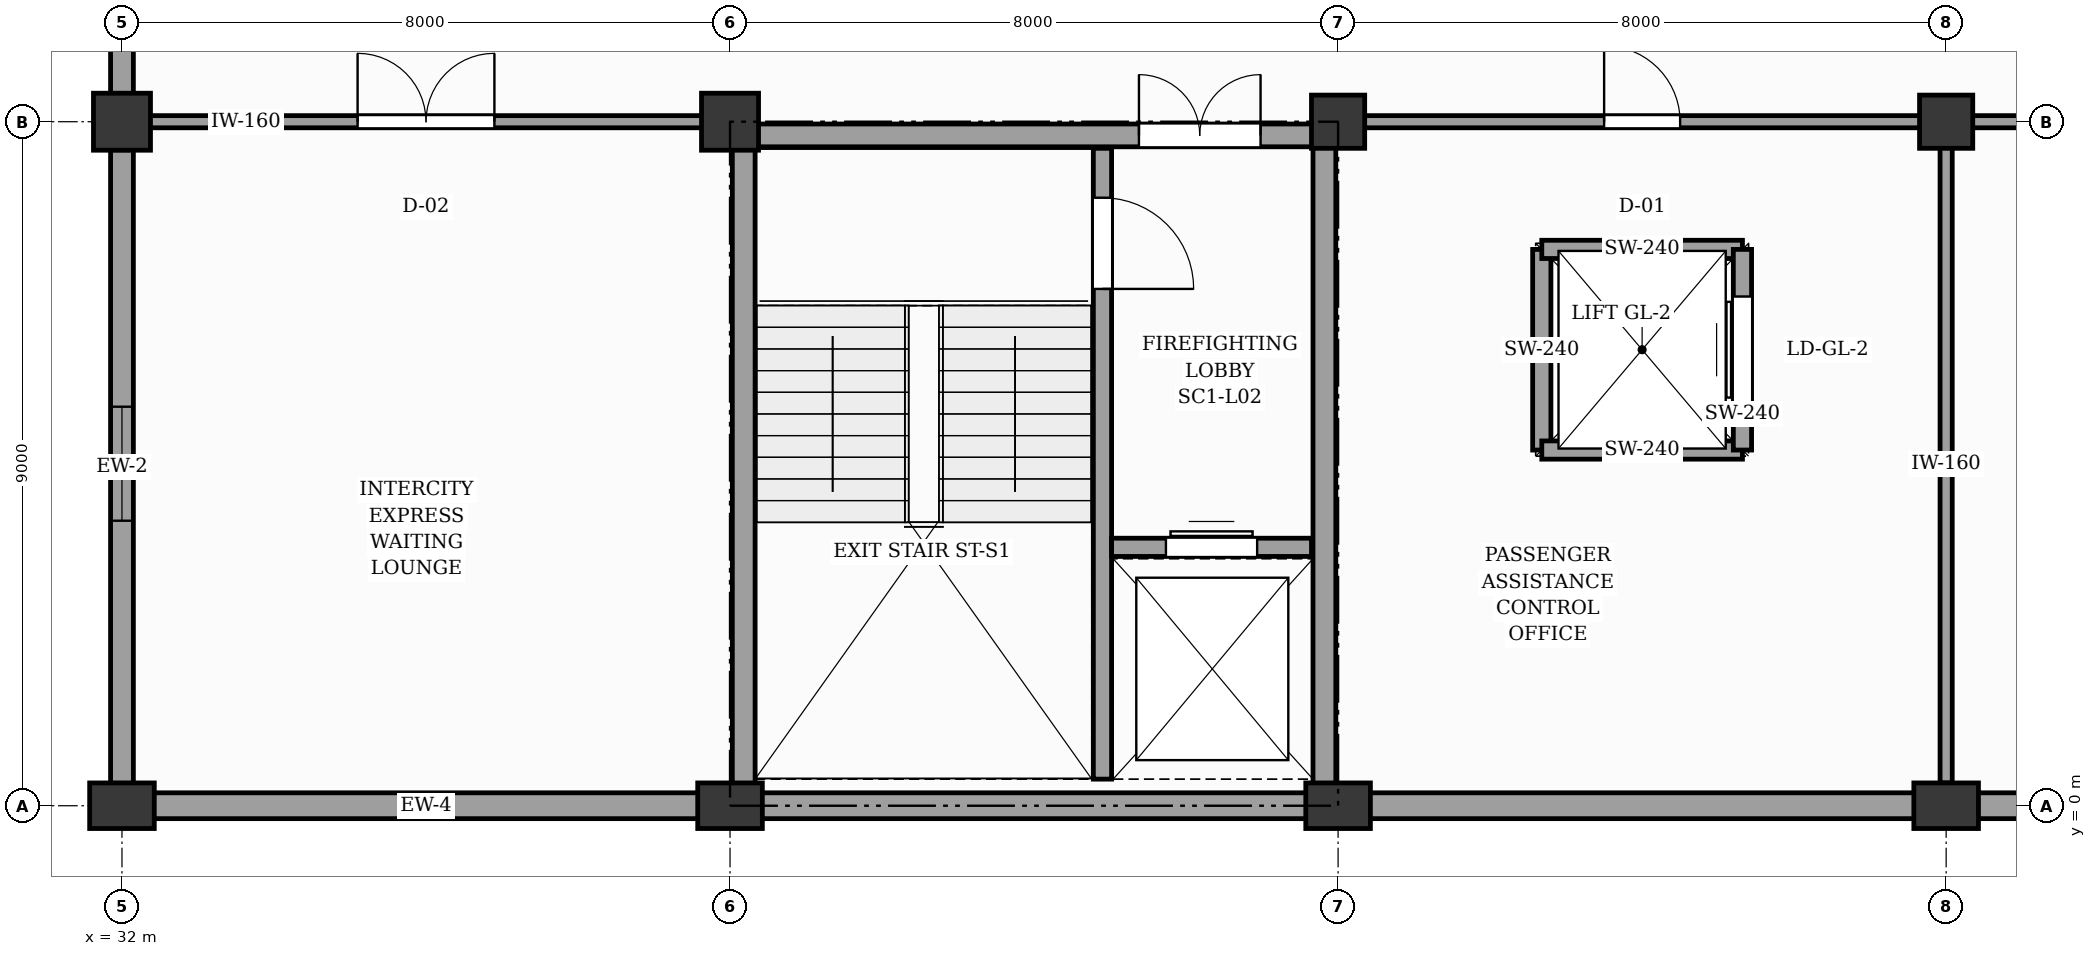
"""IFC4 building model, lengths in metres.
Left out: names, types, materials, properties, quantities, classifications, styles, units other than length and angle.
Written with IfcOpenShell. Run it as: python <this file> out.ifc"""

import sys

from ifc_helpers import new_model, si_unit, direction, frame, frame_2d, origin, origin_2d, place, context, subcontext, project, spatial, rectangle, extrude, element, fill, save


model = new_model("IFC4")
c1 = context("Model", 3, precision=1e-05, world=origin(), true_north=direction((0.0, 1.0)))
c2 = subcontext(c1, "Body", "Model", "MODEL_VIEW")
j1 = project(units=[si_unit("LENGTHUNIT", "METRE"), si_unit("PLANEANGLEUNIT", "RADIAN")], contexts=[c1])
p1 = place(None, origin())
s1 = spatial("IfcSite", under=j1, at=p1, CompositionType="ELEMENT")
p2 = place(p1, origin())
s2 = spatial("IfcBuilding", under=s1, at=p2, CompositionType="ELEMENT")
p3 = place(p2, frame((0.0, 0.0, 9.6)))
s3 = spatial("IfcBuildingStorey", under=s2, at=p3, CompositionType="ELEMENT", Elevation=9.6)
p4 = place(p3, frame((32.0, 0.0, 0.0), z_axis=(0.0, 0.0, 1.0), x_axis=(1.0, 0.0, 0.0)))
e1 = element("IfcColumn", 1, at=p4, inside=s3, PredefinedType="PILASTER", context=c2, shape_type="SweptSolid", body=[
    extrude(rectangle(XDim=0.85, YDim=0.6, at=origin_2d()), origin(), (0.0, 0.0, 1.0), 6.6),
])
p5 = place(p3, frame((32.0, 9.0, 0.0), z_axis=(0.0, 0.0, 1.0), x_axis=(1.0, 0.0, 0.0)))
e2 = element("IfcColumn", 2, at=p5, inside=s3, PredefinedType="COLUMN", context=c2, shape_type="SweptSolid", body=[
    extrude(rectangle(XDim=0.75, YDim=0.75, at=origin_2d()), origin(), (0.0, 0.0, 1.0), 6.6),
])
p6 = place(p3, frame((40.0, 0.0, 0.0), z_axis=(0.0, 0.0, 1.0), x_axis=(1.0, 0.0, 0.0)))
e3 = element("IfcColumn", 3, at=p6, inside=s3, PredefinedType="PILASTER", context=c2, shape_type="SweptSolid", body=[
    extrude(rectangle(XDim=0.85, YDim=0.6, at=origin_2d()), origin(), (0.0, 0.0, 1.0), 6.6),
])
p7 = place(p3, frame((40.0, 9.0, 0.0), z_axis=(0.0, 0.0, 1.0), x_axis=(1.0, 0.0, 0.0)))
e4 = element("IfcColumn", 4, at=p7, inside=s3, PredefinedType="COLUMN", context=c2, shape_type="SweptSolid", body=[
    extrude(rectangle(XDim=0.75, YDim=0.75, at=origin_2d()), origin(), (0.0, 0.0, 1.0), 6.6),
])
p8 = place(p3, frame((48.0, 0.0, 0.0), z_axis=(0.0, 0.0, 1.0), x_axis=(1.0, 0.0, 0.0)))
e5 = element("IfcColumn", 5, at=p8, inside=s3, PredefinedType="PILASTER", context=c2, shape_type="SweptSolid", body=[
    extrude(rectangle(XDim=0.85, YDim=0.6, at=origin_2d()), origin(), (0.0, 0.0, 1.0), 6.6),
])
p9 = place(p3, frame((48.0, 9.0, 0.0), z_axis=(0.0, 0.0, 1.0), x_axis=(1.0, 0.0, 0.0)))
e6 = element("IfcColumn", 6, at=p9, inside=s3, PredefinedType="COLUMN", context=c2, shape_type="SweptSolid", body=[
    extrude(rectangle(XDim=0.7, YDim=0.7, at=origin_2d()), origin(), (0.0, 0.0, 1.0), 6.6),
])
p10 = place(p3, frame((56.0, 0.0, 0.0), z_axis=(0.0, 0.0, 1.0), x_axis=(1.0, 0.0, 0.0)))
e7 = element("IfcColumn", 7, at=p10, inside=s3, PredefinedType="PILASTER", context=c2, shape_type="SweptSolid", body=[
    extrude(rectangle(XDim=0.85, YDim=0.6, at=origin_2d()), origin(), (0.0, 0.0, 1.0), 6.6),
])
p11 = place(p3, frame((56.0, 9.0, 0.0), z_axis=(0.0, 0.0, 1.0), x_axis=(1.0, 0.0, 0.0)))
e8 = element("IfcColumn", 8, at=p11, inside=s3, PredefinedType="COLUMN", context=c2, shape_type="SweptSolid", body=[
    extrude(rectangle(XDim=0.7, YDim=0.7, at=origin_2d()), origin(), (0.0, 0.0, 1.0), 6.6),
])
for number, where, z_axis, x_axis in (
    (9, (32.4, 0.0, 0.0), (0.0, 0.0, 1.0), (1.0, 0.0, 0.0)),
    (10, (40.4, 0.0, 0.0), (0.0, 0.0, 1.0), (1.0, 0.0, 0.0)),
    (11, (48.4, 0.0, 0.0), (0.0, 0.0, 1.0), (1.0, 0.0, 0.0)),
):
    element("IfcWall", number, at=place(p3, frame(where, z_axis=z_axis, x_axis=x_axis)), inside=s3, PredefinedType="SOLIDWALL", context=c2, shape_type="SweptSolid", body=[
        extrude(rectangle(XDim=7.2, YDim=0.34, at=frame_2d((3.6, 0.0))), origin(), (0.0, 0.0, 1.0), 5.64),
    ])
p12 = place(p3, frame((56.4, 0.0, 0.0), z_axis=(0.0, 0.0, 1.0), x_axis=(1.0, 0.0, 0.0)))
e12 = element("IfcWall", 12, at=p12, inside=s3, PredefinedType="SOLIDWALL", context=c2, shape_type="SweptSolid", body=[
    extrude(rectangle(XDim=7.2, YDim=0.34, at=frame_2d((3.6, 0.0))), origin(), (0.0, 0.0, 1.0), 4.98),
])
p13 = place(p3, frame((32.0, 0.295, 0.0), z_axis=(0.0, 0.0, 1.0), x_axis=(0.0, 1.0, 0.0)))
e13 = element("IfcWall", 13, at=p13, inside=s3, PredefinedType="SOLIDWALL", context=c2, shape_type="SweptSolid", body=[
    extrude(rectangle(XDim=8.335, YDim=0.3, at=frame_2d((4.167, 0.0))), origin(), (0.0, 0.0, 1.0), 5.51),
])
p14 = place(p13, frame((3.455, 0.0, 0.95)))
e14 = element("IfcOpeningElement", 14, at=p14, cuts=e13, PredefinedType="OPENING", context=c2, shape_type="SweptSolid", body=[
    extrude(rectangle(XDim=1.5, YDim=1.9, at=frame_2d((0.75, 0.95))), frame((0.0, 0.16, 0.0), z_axis=(0.0, -1.0, 0.0), x_axis=(1.0, 0.0, 0.0)), (0.0, 0.0, 1.0), 0.32),
])
p15 = place(p3, frame((32.0, 9.37, 0.0), z_axis=(0.0, 0.0, 1.0), x_axis=(0.0, 1.0, 0.0)))
e15 = element("IfcWall", 15, at=p15, inside=s3, PredefinedType="SOLIDWALL", context=c2, shape_type="SweptSolid", body=[
    extrude(rectangle(XDim=8.26, YDim=0.3, at=frame_2d((4.13, 0.0))), origin(), (0.0, 0.0, 1.0), 5.51),
])
p16 = place(p15, frame((3.38, 0.0, 0.95)))
e16 = element("IfcOpeningElement", 16, at=p16, cuts=e15, PredefinedType="OPENING", context=c2, shape_type="SweptSolid", body=[
    extrude(rectangle(XDim=1.5, YDim=1.9, at=frame_2d((0.75, 0.95))), frame((0.0, 0.16, 0.0), z_axis=(0.0, -1.0, 0.0), x_axis=(1.0, 0.0, 0.0)), (0.0, 0.0, 1.0), 0.32),
])
p17 = place(p3, frame((44.9, 0.35, 0.0), z_axis=(0.0, 0.0, 1.0), x_axis=(0.0, 1.0, 0.0)))
e17 = element("IfcWall", 17, at=p17, inside=s3, PredefinedType="SHEAR", context=c2, shape_type="SweptSolid", body=[
    extrude(rectangle(XDim=8.3, YDim=0.24, at=frame_2d((4.15, 0.0))), origin(), (0.0, 0.0, 1.0), 6.32),
])
p18 = place(p17, frame((6.45, 0.0, 0.0)))
e18 = element("IfcOpeningElement", 18, at=p18, cuts=e17, PredefinedType="OPENING", context=c2, shape_type="SweptSolid", body=[
    extrude(rectangle(XDim=1.2, YDim=2.15, at=frame_2d((0.6, 1.075))), frame((0.0, 0.13, 0.0), z_axis=(0.0, -1.0, 0.0), x_axis=(1.0, 0.0, 0.0)), (0.0, 0.0, 1.0), 0.26),
])
p19 = place(p3, frame((45.02, 3.4, 0.0), z_axis=(0.0, 0.0, 1.0), x_axis=(1.0, 0.0, 0.0)))
e19 = element("IfcWall", 19, at=p19, inside=s3, PredefinedType="SHEAR", context=c2, shape_type="SweptSolid", body=[
    extrude(rectangle(XDim=2.63, YDim=0.24, at=frame_2d((1.315, 0.0))), origin(), (0.0, 0.0, 1.0), 6.32),
])
p20 = place(p19, frame((0.715, 0.0, 0.0)))
e20 = element("IfcOpeningElement", 20, at=p20, cuts=e19, PredefinedType="OPENING", context=c2, shape_type="SweptSolid", body=[
    extrude(rectangle(XDim=1.2, YDim=2.15, at=frame_2d((0.6, 1.075))), frame((0.0, 0.13, 0.0), z_axis=(0.0, -1.0, 0.0), x_axis=(1.0, 0.0, 0.0)), (0.0, 0.0, 1.0), 0.26),
])
for number, where, z_axis, x_axis in (
    (21, (40.18, 0.18, 0.0), (0.0, 0.0, 1.0), (0.0, 1.0, 0.0)),
    (22, (47.82, 0.18, 0.0), (0.0, 0.0, 1.0), (0.0, 1.0, 0.0)),
):
    element("IfcWall", number, at=place(p3, frame(where, z_axis=z_axis, x_axis=x_axis)), inside=s3, PredefinedType="SHEAR", context=c2, shape_type="SweptSolid", body=[
        extrude(rectangle(XDim=8.64, YDim=0.3, at=frame_2d((4.32, 0.0))), origin(), (0.0, 0.0, 1.0), 6.32),
    ])
p21 = place(p3, frame((40.03, 8.82, 0.0), z_axis=(0.0, 0.0, 1.0), x_axis=(1.0, 0.0, 0.0)))
e23 = element("IfcWall", 23, at=p21, inside=s3, PredefinedType="SHEAR", context=c2, shape_type="SweptSolid", body=[
    extrude(rectangle(XDim=7.94, YDim=0.3, at=frame_2d((3.97, 0.0))), origin(), (0.0, 0.0, 1.0), 6.32),
])
p22 = place(p21, frame((5.35, 0.0, 0.0)))
e24 = element("IfcOpeningElement", 24, at=p22, cuts=e23, PredefinedType="OPENING", context=c2, shape_type="SweptSolid", body=[
    extrude(rectangle(XDim=1.6, YDim=2.15, at=frame_2d((0.8, 1.075))), frame((0.0, 0.16, 0.0), z_axis=(0.0, -1.0, 0.0), x_axis=(1.0, 0.0, 0.0)), (0.0, 0.0, 1.0), 0.32),
])
for number, where, z_axis, x_axis in (
    (25, (50.68, 4.68, 0.0), (0.0, 0.0, 1.0), (0.0, 1.0, 0.0)),
    (26, (50.68, 4.68, 0.0), (0.0, 0.0, 1.0), (1.0, 0.0, 0.0)),
    (27, (50.68, 7.32, 0.0), (0.0, 0.0, 1.0), (1.0, 0.0, 0.0)),
):
    element("IfcWall", number, at=place(p3, frame(where, z_axis=z_axis, x_axis=x_axis)), inside=s3, PredefinedType="SHEAR", context=c2, shape_type="SweptSolid", body=[
        extrude(rectangle(XDim=2.64, YDim=0.24, at=frame_2d((1.32, 0.0))), origin(), (0.0, 0.0, 1.0), 6.35),
    ])
p23 = place(p3, frame((53.32, 4.68, 0.0), z_axis=(0.0, 0.0, 1.0), x_axis=(0.0, 1.0, 0.0)))
e28 = element("IfcWall", 28, at=p23, inside=s3, PredefinedType="SHEAR", context=c2, shape_type="SweptSolid", body=[
    extrude(rectangle(XDim=2.64, YDim=0.24, at=frame_2d((1.32, 0.0))), origin(), (0.0, 0.0, 1.0), 6.35),
])
p24 = place(p23, frame((0.62, 0.0, 0.0)))
e29 = element("IfcOpeningElement", 29, at=p24, cuts=e28, PredefinedType="OPENING", context=c2, shape_type="SweptSolid", body=[
    extrude(rectangle(XDim=1.4, YDim=2.15, at=frame_2d((0.7, 1.075))), frame((0.0, 0.13, 0.0), z_axis=(0.0, -1.0, 0.0), x_axis=(1.0, 0.0, 0.0)), (0.0, 0.0, 1.0), 0.26),
])
p25 = place(p3, frame((32.3, 9.0, 0.0), z_axis=(0.0, 0.0, 1.0), x_axis=(1.0, 0.0, 0.0)))
e30 = element("IfcWall", 30, at=p25, inside=s3, PredefinedType="PARTITIONING", context=c2, shape_type="SweptSolid", body=[
    extrude(rectangle(XDim=7.4, YDim=0.16, at=frame_2d((3.7, 0.0))), origin(), (0.0, 0.0, 1.0), 5.5),
])
p26 = place(p25, frame((2.8, 0.0, 0.0)))
e31 = element("IfcOpeningElement", 31, at=p26, cuts=e30, PredefinedType="OPENING", context=c2, shape_type="SweptSolid", body=[
    extrude(rectangle(XDim=1.8, YDim=2.25, at=frame_2d((0.9, 1.125))), frame((0.0, 0.09, 0.0), z_axis=(0.0, -1.0, 0.0), x_axis=(1.0, 0.0, 0.0)), (0.0, 0.0, 1.0), 0.18),
])
p27 = place(p3, frame((48.3, 9.0, 0.0), z_axis=(0.0, 0.0, 1.0), x_axis=(1.0, 0.0, 0.0)))
e32 = element("IfcWall", 32, at=p27, inside=s3, PredefinedType="PARTITIONING", context=c2, shape_type="SweptSolid", body=[
    extrude(rectangle(XDim=7.4, YDim=0.16, at=frame_2d((3.7, 0.0))), origin(), (0.0, 0.0, 1.0), 5.5),
])
p28 = place(p27, frame((3.2, 0.0, 0.0)))
e33 = element("IfcOpeningElement", 33, at=p28, cuts=e32, PredefinedType="OPENING", context=c2, shape_type="SweptSolid", body=[
    extrude(rectangle(XDim=1.0, YDim=2.1, at=frame_2d((0.5, 1.05))), frame((0.0, 0.09, 0.0), z_axis=(0.0, -1.0, 0.0), x_axis=(1.0, 0.0, 0.0)), (0.0, 0.0, 1.0), 0.18),
])
p29 = place(p3, frame((56.0, 0.3, 0.0), z_axis=(0.0, 0.0, 1.0), x_axis=(0.0, 1.0, 0.0)))
e34 = element("IfcWall", 34, at=p29, inside=s3, PredefinedType="PARTITIONING", context=c2, shape_type="SweptSolid", body=[
    extrude(rectangle(XDim=8.4, YDim=0.16, at=frame_2d((4.2, 0.0))), origin(), (0.0, 0.0, 1.0), 5.5),
])
p30 = place(p3, frame((56.3, 9.0, 0.0), z_axis=(0.0, 0.0, 1.0), x_axis=(1.0, 0.0, 0.0)))
e35 = element("IfcWall", 35, at=p30, inside=s3, PredefinedType="PARTITIONING", context=c2, shape_type="SweptSolid", body=[
    extrude(rectangle(XDim=7.4, YDim=0.16, at=frame_2d((3.7, 0.0))), origin(), (0.0, 0.0, 1.0), 4.68),
])
p31 = place(p30, frame((3.2, 0.0, 0.0)))
e36 = element("IfcOpeningElement", 36, at=p31, cuts=e35, PredefinedType="OPENING", context=c2, shape_type="SweptSolid", body=[
    extrude(rectangle(XDim=1.0, YDim=2.1, at=frame_2d((0.5, 1.05))), frame((0.0, 0.09, 0.0), z_axis=(0.0, -1.0, 0.0), x_axis=(1.0, 0.0, 0.0)), (0.0, 0.0, 1.0), 0.18),
])
p32 = place(p14, origin())
e37 = element("IfcWindow", 37, at=p32, inside=s3, PartitioningType="SINGLE_PANEL", PredefinedType="WINDOW", context=c2, shape_type="SweptSolid", body=[
    extrude(rectangle(XDim=1.5, YDim=1.9, at=frame_2d((0.75, 0.95))), frame((0.0, 0.03, 0.0), z_axis=(0.0, -1.0, 0.0), x_axis=(1.0, 0.0, 0.0)), (0.0, 0.0, 1.0), 0.06),
])
fill(e14, e37)
p33 = place(p18, frame((1.2, 0.0, 0.0), z_axis=(0.0, 0.0, 1.0), x_axis=(-1.0, 0.0, 0.0)))
e38 = element("IfcDoor", 38, at=p33, inside=s3, OperationType="SINGLE_SWING_LEFT", PredefinedType="DOOR", context=c2, shape_type="SweptSolid", body=[
    extrude(rectangle(XDim=1.2, YDim=2.15, at=frame_2d((0.6, 1.075))), frame((0.0, 0.025, 0.0), z_axis=(0.0, -1.0, 0.0), x_axis=(1.0, 0.0, 0.0)), (0.0, 0.0, 1.0), 0.05),
])
fill(e18, e38)
p34 = place(p20, origin())
e39 = element("IfcDoor", 39, at=p34, inside=s3, OperationType="DOUBLE_DOOR_SLIDING", PredefinedType="DOOR", context=c2, shape_type="SweptSolid", body=[
    extrude(rectangle(XDim=1.2, YDim=2.15, at=frame_2d((0.6, 1.075))), frame((0.0, 0.025, 0.0), z_axis=(0.0, -1.0, 0.0), x_axis=(1.0, 0.0, 0.0)), (0.0, 0.0, 1.0), 0.05),
])
fill(e20, e39)
p35 = place(p22, origin())
e40 = element("IfcDoor", 40, at=p35, inside=s3, OperationType="DOUBLE_DOOR_SINGLE_SWING", PredefinedType="DOOR", context=c2, shape_type="SweptSolid", body=[
    extrude(rectangle(XDim=1.6, YDim=2.15, at=frame_2d((0.8, 1.075))), frame((0.0, 0.025, 0.0), z_axis=(0.0, -1.0, 0.0), x_axis=(1.0, 0.0, 0.0)), (0.0, 0.0, 1.0), 0.05),
])
fill(e24, e40)
p36 = place(p24, origin())
e41 = element("IfcDoor", 41, at=p36, inside=s3, OperationType="DOUBLE_DOOR_SLIDING", PredefinedType="DOOR", context=c2, shape_type="SweptSolid", body=[
    extrude(rectangle(XDim=1.4, YDim=2.15, at=frame_2d((0.7, 1.075))), frame((0.0, 0.025, 0.0), z_axis=(0.0, -1.0, 0.0), x_axis=(1.0, 0.0, 0.0)), (0.0, 0.0, 1.0), 0.05),
])
fill(e29, e41)
p37 = place(p26, origin())
e42 = element("IfcDoor", 42, at=p37, inside=s3, OperationType="DOUBLE_DOOR_SINGLE_SWING", PredefinedType="DOOR", context=c2, shape_type="SweptSolid", body=[
    extrude(rectangle(XDim=1.8, YDim=2.25, at=frame_2d((0.9, 1.125))), frame((0.0, 0.025, 0.0), z_axis=(0.0, -1.0, 0.0), x_axis=(1.0, 0.0, 0.0)), (0.0, 0.0, 1.0), 0.05),
])
fill(e31, e42)
p38 = place(p28, origin())
e43 = element("IfcDoor", 43, at=p38, inside=s3, OperationType="SINGLE_SWING_LEFT", PredefinedType="DOOR", context=c2, shape_type="SweptSolid", body=[
    extrude(rectangle(XDim=1.0, YDim=2.1, at=frame_2d((0.5, 1.05))), frame((0.0, 0.025, 0.0), z_axis=(0.0, -1.0, 0.0), x_axis=(1.0, 0.0, 0.0)), (0.0, 0.0, 1.0), 0.05),
])
fill(e33, e43)
save(model, sys.argv[1])
